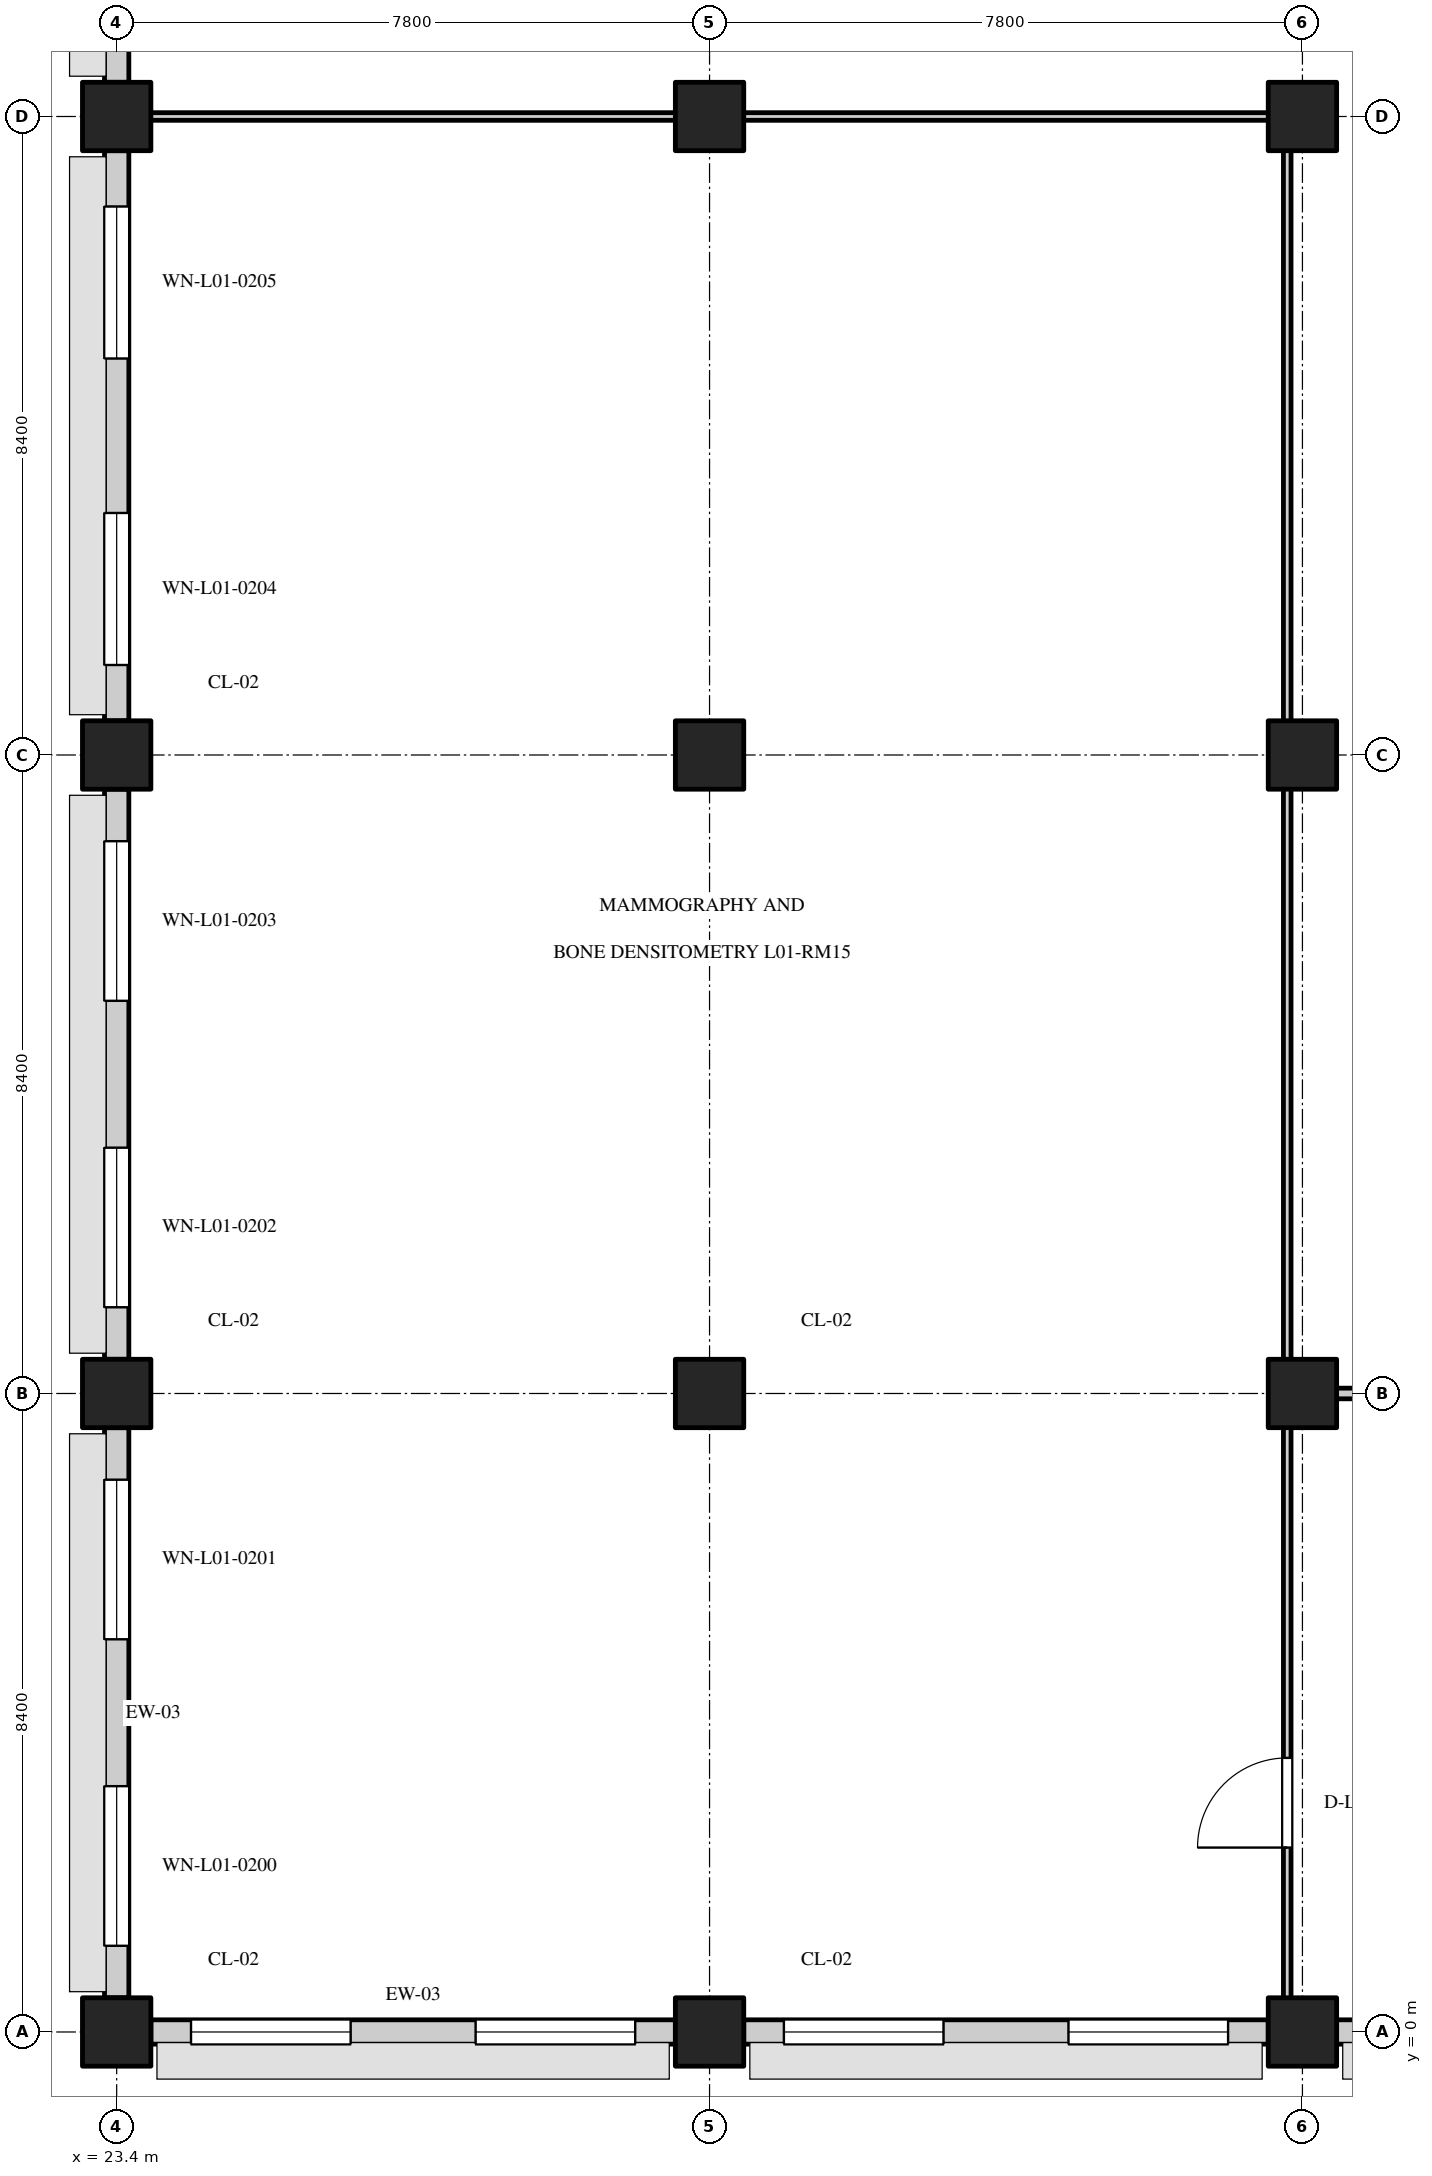
"""IFC4 building model, lengths in metres.
Left out: names, types, materials, properties, quantities, classifications, styles, units other than length and angle.
Written with IfcOpenShell. Run it as: python <this file> out.ifc"""

import sys

from ifc_helpers import new_model, si_unit, direction, frame, frame_2d, origin, origin_2d, place, context, subcontext, project, spatial, rectangle, extrude, element, fill, save


model = new_model("IFC4")
c1 = context("Model", 3, precision=1e-05, world=origin(), true_north=direction((0.0, 1.0)))
c2 = subcontext(c1, "Body", "Model", "MODEL_VIEW")
j1 = project(units=[si_unit("LENGTHUNIT", "METRE"), si_unit("PLANEANGLEUNIT", "RADIAN")], contexts=[c1])
p1 = place(None, origin())
s1 = spatial("IfcSite", under=j1, at=p1, CompositionType="ELEMENT")
p2 = place(p1, origin())
s2 = spatial("IfcBuilding", under=s1, at=p2, CompositionType="ELEMENT")
p3 = place(p2, frame((0.0, 0.0, 4.8)))
s3 = spatial("IfcBuildingStorey", under=s2, at=p3, CompositionType="ELEMENT", Elevation=4.8)
for number, where, z_axis, x_axis in (
    (1, (23.4, 0.0, 0.0), (0.0, 0.0, 1.0), (1.0, 0.0, 0.0)),
    (2, (23.4, 8.4, 0.0), (0.0, 0.0, 1.0), (1.0, 0.0, 0.0)),
    (3, (23.4, 16.8, 0.0), (0.0, 0.0, 1.0), (1.0, 0.0, 0.0)),
    (4, (23.4, 25.2, 0.0), (0.0, 0.0, 1.0), (1.0, 0.0, 0.0)),
    (5, (31.2, 0.0, 0.0), (0.0, 0.0, 1.0), (1.0, 0.0, 0.0)),
    (6, (31.2, 8.4, 0.0), (0.0, 0.0, 1.0), (1.0, 0.0, 0.0)),
    (7, (31.2, 16.8, 0.0), (0.0, 0.0, 1.0), (1.0, 0.0, 0.0)),
    (8, (31.2, 25.2, 0.0), (0.0, 0.0, 1.0), (1.0, 0.0, 0.0)),
    (9, (39.0, 0.0, 0.0), (0.0, 0.0, 1.0), (1.0, 0.0, 0.0)),
    (10, (39.0, 8.4, 0.0), (0.0, 0.0, 1.0), (1.0, 0.0, 0.0)),
    (11, (39.0, 16.8, 0.0), (0.0, 0.0, 1.0), (1.0, 0.0, 0.0)),
    (12, (39.0, 25.2, 0.0), (0.0, 0.0, 1.0), (1.0, 0.0, 0.0)),
):
    element("IfcColumn", number, at=place(p3, frame(where, z_axis=z_axis, x_axis=x_axis)), inside=s3, PredefinedType="COLUMN", context=c2, shape_type="SweptSolid", body=[
        extrude(rectangle(XDim=0.9, YDim=0.9, at=origin_2d()), origin(), (0.0, 0.0, 1.0), 4.8),
    ])
p4 = place(p3, frame((23.85, 0.0, 0.0), z_axis=(0.0, 0.0, 1.0), x_axis=(1.0, 0.0, 0.0)))
e13 = element("IfcWall", 13, at=p4, inside=s3, PredefinedType="STANDARD", context=c2, shape_type="SweptSolid", body=[
    extrude(rectangle(XDim=6.9, YDim=0.32, at=frame_2d((3.45, 0.0))), origin(), (0.0, 0.0, 1.0), 3.75),
])
p5 = place(p4, frame((0.528, 0.0, 0.75)))
e14 = element("IfcOpeningElement", 14, at=p5, cuts=e13, PredefinedType="OPENING", context=c2, shape_type="SweptSolid", body=[
    extrude(rectangle(XDim=2.1, YDim=1.55, at=frame_2d((1.05, 0.775))), frame((0.0, 0.172, 0.0), z_axis=(0.0, -1.0, 0.0), x_axis=(1.0, 0.0, 0.0)), (0.0, 0.0, 1.0), 0.344),
])
p6 = place(p4, frame((4.272, 0.0, 0.75)))
e15 = element("IfcOpeningElement", 15, at=p6, cuts=e13, PredefinedType="OPENING", context=c2, shape_type="SweptSolid", body=[
    extrude(rectangle(XDim=2.1, YDim=1.55, at=frame_2d((1.05, 0.775))), frame((0.0, 0.172, 0.0), z_axis=(0.0, -1.0, 0.0), x_axis=(1.0, 0.0, 0.0)), (0.0, 0.0, 1.0), 0.344),
])
p7 = place(p3, frame((31.65, 0.0, 0.0), z_axis=(0.0, 0.0, 1.0), x_axis=(1.0, 0.0, 0.0)))
e16 = element("IfcWall", 16, at=p7, inside=s3, PredefinedType="STANDARD", context=c2, shape_type="SweptSolid", body=[
    extrude(rectangle(XDim=6.9, YDim=0.32, at=frame_2d((3.45, 0.0))), origin(), (0.0, 0.0, 1.0), 3.75),
])
p8 = place(p7, frame((0.528, 0.0, 0.75)))
e17 = element("IfcOpeningElement", 17, at=p8, cuts=e16, PredefinedType="OPENING", context=c2, shape_type="SweptSolid", body=[
    extrude(rectangle(XDim=2.1, YDim=1.45, at=frame_2d((1.05, 0.725))), frame((0.0, 0.172, 0.0), z_axis=(0.0, -1.0, 0.0), x_axis=(1.0, 0.0, 0.0)), (0.0, 0.0, 1.0), 0.344),
])
p9 = place(p7, frame((4.272, 0.0, 0.75)))
e18 = element("IfcOpeningElement", 18, at=p9, cuts=e16, PredefinedType="OPENING", context=c2, shape_type="SweptSolid", body=[
    extrude(rectangle(XDim=2.1, YDim=1.45, at=frame_2d((1.05, 0.725))), frame((0.0, 0.172, 0.0), z_axis=(0.0, -1.0, 0.0), x_axis=(1.0, 0.0, 0.0)), (0.0, 0.0, 1.0), 0.344),
])
p10 = place(p3, frame((39.45, 0.0, 0.0), z_axis=(0.0, 0.0, 1.0), x_axis=(1.0, 0.0, 0.0)))
e19 = element("IfcWall", 19, at=p10, inside=s3, PredefinedType="STANDARD", context=c2, shape_type="SweptSolid", body=[
    extrude(rectangle(XDim=6.9, YDim=0.32, at=frame_2d((3.45, 0.0))), origin(), (0.0, 0.0, 1.0), 3.75),
])
p11 = place(p10, frame((0.578, 0.0, 0.75)))
e20 = element("IfcOpeningElement", 20, at=p11, cuts=e19, PredefinedType="OPENING", context=c2, shape_type="SweptSolid", body=[
    extrude(rectangle(XDim=2.0, YDim=1.75, at=frame_2d((1.0, 0.875))), frame((0.0, 0.172, 0.0), z_axis=(0.0, -1.0, 0.0), x_axis=(1.0, 0.0, 0.0)), (0.0, 0.0, 1.0), 0.344),
])
p12 = place(p10, frame((4.322, 0.0, 0.75)))
e21 = element("IfcOpeningElement", 21, at=p12, cuts=e19, PredefinedType="OPENING", context=c2, shape_type="SweptSolid", body=[
    extrude(rectangle(XDim=2.0, YDim=1.75, at=frame_2d((1.0, 0.875))), frame((0.0, 0.172, 0.0), z_axis=(0.0, -1.0, 0.0), x_axis=(1.0, 0.0, 0.0)), (0.0, 0.0, 1.0), 0.344),
])
p13 = place(p3, frame((23.4, 0.45, 0.0), z_axis=(0.0, 0.0, 1.0), x_axis=(0.0, 1.0, 0.0)))
e22 = element("IfcWall", 22, at=p13, inside=s3, PredefinedType="STANDARD", context=c2, shape_type="SweptSolid", body=[
    extrude(rectangle(XDim=7.5, YDim=0.32, at=frame_2d((3.75, 0.0))), origin(), (0.0, 0.0, 1.0), 3.75),
])
p14 = place(p13, frame((0.684, 0.0, 0.75)))
e23 = element("IfcOpeningElement", 23, at=p14, cuts=e22, PredefinedType="OPENING", context=c2, shape_type="SweptSolid", body=[
    extrude(rectangle(XDim=2.1, YDim=1.55, at=frame_2d((1.05, 0.775))), frame((0.0, 0.172, 0.0), z_axis=(0.0, -1.0, 0.0), x_axis=(1.0, 0.0, 0.0)), (0.0, 0.0, 1.0), 0.344),
])
p15 = place(p13, frame((4.716, 0.0, 0.75)))
e24 = element("IfcOpeningElement", 24, at=p15, cuts=e22, PredefinedType="OPENING", context=c2, shape_type="SweptSolid", body=[
    extrude(rectangle(XDim=2.1, YDim=1.55, at=frame_2d((1.05, 0.775))), frame((0.0, 0.172, 0.0), z_axis=(0.0, -1.0, 0.0), x_axis=(1.0, 0.0, 0.0)), (0.0, 0.0, 1.0), 0.344),
])
p16 = place(p3, frame((23.4, 8.85, 0.0), z_axis=(0.0, 0.0, 1.0), x_axis=(0.0, 1.0, 0.0)))
e25 = element("IfcWall", 25, at=p16, inside=s3, PredefinedType="STANDARD", context=c2, shape_type="SweptSolid", body=[
    extrude(rectangle(XDim=7.5, YDim=0.32, at=frame_2d((3.75, 0.0))), origin(), (0.0, 0.0, 1.0), 3.75),
])
p17 = place(p16, frame((0.684, 0.0, 0.75)))
e26 = element("IfcOpeningElement", 26, at=p17, cuts=e25, PredefinedType="OPENING", context=c2, shape_type="SweptSolid", body=[
    extrude(rectangle(XDim=2.1, YDim=1.45, at=frame_2d((1.05, 0.725))), frame((0.0, 0.172, 0.0), z_axis=(0.0, -1.0, 0.0), x_axis=(1.0, 0.0, 0.0)), (0.0, 0.0, 1.0), 0.344),
])
p18 = place(p16, frame((4.716, 0.0, 0.75)))
e27 = element("IfcOpeningElement", 27, at=p18, cuts=e25, PredefinedType="OPENING", context=c2, shape_type="SweptSolid", body=[
    extrude(rectangle(XDim=2.1, YDim=1.45, at=frame_2d((1.05, 0.725))), frame((0.0, 0.172, 0.0), z_axis=(0.0, -1.0, 0.0), x_axis=(1.0, 0.0, 0.0)), (0.0, 0.0, 1.0), 0.344),
])
p19 = place(p3, frame((23.4, 17.25, 0.0), z_axis=(0.0, 0.0, 1.0), x_axis=(0.0, 1.0, 0.0)))
e28 = element("IfcWall", 28, at=p19, inside=s3, PredefinedType="STANDARD", context=c2, shape_type="SweptSolid", body=[
    extrude(rectangle(XDim=7.5, YDim=0.32, at=frame_2d((3.75, 0.0))), origin(), (0.0, 0.0, 1.0), 3.75),
])
p20 = place(p19, frame((0.734, 0.0, 0.75)))
e29 = element("IfcOpeningElement", 29, at=p20, cuts=e28, PredefinedType="OPENING", context=c2, shape_type="SweptSolid", body=[
    extrude(rectangle(XDim=2.0, YDim=1.75, at=frame_2d((1.0, 0.875))), frame((0.0, 0.172, 0.0), z_axis=(0.0, -1.0, 0.0), x_axis=(1.0, 0.0, 0.0)), (0.0, 0.0, 1.0), 0.344),
])
p21 = place(p19, frame((4.766, 0.0, 0.75)))
e30 = element("IfcOpeningElement", 30, at=p21, cuts=e28, PredefinedType="OPENING", context=c2, shape_type="SweptSolid", body=[
    extrude(rectangle(XDim=2.0, YDim=1.75, at=frame_2d((1.0, 0.875))), frame((0.0, 0.172, 0.0), z_axis=(0.0, -1.0, 0.0), x_axis=(1.0, 0.0, 0.0)), (0.0, 0.0, 1.0), 0.344),
])
p22 = place(p3, frame((23.4, 25.65, 0.0), z_axis=(0.0, 0.0, 1.0), x_axis=(0.0, 1.0, 0.0)))
e31 = element("IfcWall", 31, at=p22, inside=s3, PredefinedType="STANDARD", context=c2, shape_type="SweptSolid", body=[
    extrude(rectangle(XDim=7.5, YDim=0.32, at=frame_2d((3.75, 0.0))), origin(), (0.0, 0.0, 1.0), 3.75),
])
p23 = place(p22, frame((0.734, 0.0, 0.75)))
e32 = element("IfcOpeningElement", 32, at=p23, cuts=e31, PredefinedType="OPENING", context=c2, shape_type="SweptSolid", body=[
    extrude(rectangle(XDim=2.0, YDim=1.65, at=frame_2d((1.0, 0.825))), frame((0.0, 0.172, 0.0), z_axis=(0.0, -1.0, 0.0), x_axis=(1.0, 0.0, 0.0)), (0.0, 0.0, 1.0), 0.344),
])
p24 = place(p22, frame((4.766, 0.0, 0.75)))
e33 = element("IfcOpeningElement", 33, at=p24, cuts=e31, PredefinedType="OPENING", context=c2, shape_type="SweptSolid", body=[
    extrude(rectangle(XDim=2.0, YDim=1.65, at=frame_2d((1.0, 0.825))), frame((0.0, 0.172, 0.0), z_axis=(0.0, -1.0, 0.0), x_axis=(1.0, 0.0, 0.0)), (0.0, 0.0, 1.0), 0.344),
])
p25 = place(p3, frame((38.8, 0.085, 0.0), z_axis=(0.0, 0.0, 1.0), x_axis=(0.0, 1.0, 0.0)))
e34 = element("IfcWall", 34, at=p25, inside=s3, PredefinedType="PARTITIONING", context=c2, shape_type="SweptSolid", body=[
    extrude(rectangle(XDim=25.03, YDim=0.1, at=frame_2d((12.515, 0.0))), origin(), (0.0, 0.0, 1.0), 3.7),
])
p26 = place(p25, frame((2.341, 0.0, 0.0)))
e35 = element("IfcOpeningElement", 35, at=p26, cuts=e34, PredefinedType="OPENING", context=c2, shape_type="SweptSolid", body=[
    extrude(rectangle(XDim=1.18, YDim=2.2, at=frame_2d((0.59, 1.1))), frame((0.0, 0.062, 0.0), z_axis=(0.0, -1.0, 0.0), x_axis=(1.0, 0.0, 0.0)), (0.0, 0.0, 1.0), 0.124),
])
p27 = place(p3, frame((30.79, 0.0, 0.0), z_axis=(0.0, 0.0, 1.0), x_axis=(1.0, 0.0, 0.0)))
e36 = element("IfcWall", 36, at=p27, inside=s3, PredefinedType="PARTITIONING", context=c2, shape_type="SweptSolid", body=[
    extrude(rectangle(XDim=0.82, YDim=0.1, at=frame_2d((0.41, 0.0))), origin(), (0.0, 0.0, 1.0), 3.7),
])
p28 = place(p3, frame((23.485, 25.2, 0.0), z_axis=(0.0, 0.0, 1.0), x_axis=(1.0, 0.0, 0.0)))
e37 = element("IfcWall", 37, at=p28, inside=s3, PredefinedType="PARTITIONING", context=c2, shape_type="SweptSolid", body=[
    extrude(rectangle(XDim=15.23, YDim=0.1, at=frame_2d((7.615, 0.0))), origin(), (0.0, 0.0, 1.0), 3.7),
])
for number, where, z_axis, x_axis in (
    (38, (23.4, 7.99, 0.0), (0.0, 0.0, 1.0), (0.0, 1.0, 0.0)),
    (39, (23.4, 16.39, 0.0), (0.0, 0.0, 1.0), (0.0, 1.0, 0.0)),
):
    element("IfcWall", number, at=place(p3, frame(where, z_axis=z_axis, x_axis=x_axis)), inside=s3, PredefinedType="PARTITIONING", context=c2, shape_type="SweptSolid", body=[
        extrude(rectangle(XDim=0.82, YDim=0.1, at=frame_2d((0.41, 0.0))), origin(), (0.0, 0.0, 1.0), 3.7),
    ])
p29 = place(p3, frame((39.085, 8.4, 0.0), z_axis=(0.0, 0.0, 1.0), x_axis=(1.0, 0.0, 0.0)))
e40 = element("IfcWall", 40, at=p29, inside=s3, PredefinedType="PARTITIONING", context=c2, shape_type="SweptSolid", body=[
    extrude(rectangle(XDim=15.23, YDim=0.14, at=frame_2d((7.615, 0.0))), origin(), (0.0, 0.0, 1.0), 4.43),
])
p30 = place(p29, frame((2.644, 0.0, 0.0)))
e41 = element("IfcOpeningElement", 41, at=p30, cuts=e40, PredefinedType="OPENING", context=c2, shape_type="SweptSolid", body=[
    extrude(rectangle(XDim=1.05, YDim=2.1, at=frame_2d((0.525, 1.05))), frame((0.0, 0.082, 0.0), z_axis=(0.0, -1.0, 0.0), x_axis=(1.0, 0.0, 0.0)), (0.0, 0.0, 1.0), 0.164),
])
p31 = place(p5, origin())
e42 = element("IfcWindow", 42, at=p31, inside=s3, PartitioningType="DOUBLE_PANEL_VERTICAL", PredefinedType="WINDOW", context=c2, shape_type="SweptSolid", body=[
    extrude(rectangle(XDim=2.1, YDim=1.55, at=frame_2d((1.05, 0.775))), frame((0.0, 0.03, 0.0), z_axis=(0.0, -1.0, 0.0), x_axis=(1.0, 0.0, 0.0)), (0.0, 0.0, 1.0), 0.06),
])
fill(e14, e42)
p32 = place(p6, origin())
e43 = element("IfcWindow", 43, at=p32, inside=s3, PartitioningType="DOUBLE_PANEL_VERTICAL", PredefinedType="WINDOW", context=c2, shape_type="SweptSolid", body=[
    extrude(rectangle(XDim=2.1, YDim=1.55, at=frame_2d((1.05, 0.775))), frame((0.0, 0.03, 0.0), z_axis=(0.0, -1.0, 0.0), x_axis=(1.0, 0.0, 0.0)), (0.0, 0.0, 1.0), 0.06),
])
fill(e15, e43)
p33 = place(p8, origin())
e44 = element("IfcWindow", 44, at=p33, inside=s3, PartitioningType="DOUBLE_PANEL_VERTICAL", PredefinedType="WINDOW", context=c2, shape_type="SweptSolid", body=[
    extrude(rectangle(XDim=2.1, YDim=1.45, at=frame_2d((1.05, 0.725))), frame((0.0, 0.03, 0.0), z_axis=(0.0, -1.0, 0.0), x_axis=(1.0, 0.0, 0.0)), (0.0, 0.0, 1.0), 0.06),
])
fill(e17, e44)
p34 = place(p9, origin())
e45 = element("IfcWindow", 45, at=p34, inside=s3, PartitioningType="DOUBLE_PANEL_VERTICAL", PredefinedType="WINDOW", context=c2, shape_type="SweptSolid", body=[
    extrude(rectangle(XDim=2.1, YDim=1.45, at=frame_2d((1.05, 0.725))), frame((0.0, 0.03, 0.0), z_axis=(0.0, -1.0, 0.0), x_axis=(1.0, 0.0, 0.0)), (0.0, 0.0, 1.0), 0.06),
])
fill(e18, e45)
p35 = place(p14, origin())
e46 = element("IfcWindow", 46, at=p35, inside=s3, PartitioningType="DOUBLE_PANEL_VERTICAL", PredefinedType="WINDOW", context=c2, shape_type="SweptSolid", body=[
    extrude(rectangle(XDim=2.1, YDim=1.55, at=frame_2d((1.05, 0.775))), frame((0.0, 0.03, 0.0), z_axis=(0.0, -1.0, 0.0), x_axis=(1.0, 0.0, 0.0)), (0.0, 0.0, 1.0), 0.06),
])
fill(e23, e46)
p36 = place(p15, origin())
e47 = element("IfcWindow", 47, at=p36, inside=s3, PartitioningType="DOUBLE_PANEL_VERTICAL", PredefinedType="WINDOW", context=c2, shape_type="SweptSolid", body=[
    extrude(rectangle(XDim=2.1, YDim=1.55, at=frame_2d((1.05, 0.775))), frame((0.0, 0.03, 0.0), z_axis=(0.0, -1.0, 0.0), x_axis=(1.0, 0.0, 0.0)), (0.0, 0.0, 1.0), 0.06),
])
fill(e24, e47)
p37 = place(p17, origin())
e48 = element("IfcWindow", 48, at=p37, inside=s3, PartitioningType="DOUBLE_PANEL_VERTICAL", PredefinedType="WINDOW", context=c2, shape_type="SweptSolid", body=[
    extrude(rectangle(XDim=2.1, YDim=1.45, at=frame_2d((1.05, 0.725))), frame((0.0, 0.03, 0.0), z_axis=(0.0, -1.0, 0.0), x_axis=(1.0, 0.0, 0.0)), (0.0, 0.0, 1.0), 0.06),
])
fill(e26, e48)
p38 = place(p18, origin())
e49 = element("IfcWindow", 49, at=p38, inside=s3, PartitioningType="DOUBLE_PANEL_VERTICAL", PredefinedType="WINDOW", context=c2, shape_type="SweptSolid", body=[
    extrude(rectangle(XDim=2.1, YDim=1.45, at=frame_2d((1.05, 0.725))), frame((0.0, 0.03, 0.0), z_axis=(0.0, -1.0, 0.0), x_axis=(1.0, 0.0, 0.0)), (0.0, 0.0, 1.0), 0.06),
])
fill(e27, e49)
p39 = place(p20, origin())
e50 = element("IfcWindow", 50, at=p39, inside=s3, PartitioningType="DOUBLE_PANEL_VERTICAL", PredefinedType="WINDOW", context=c2, shape_type="SweptSolid", body=[
    extrude(rectangle(XDim=2.0, YDim=1.75, at=frame_2d((1.0, 0.875))), frame((0.0, 0.03, 0.0), z_axis=(0.0, -1.0, 0.0), x_axis=(1.0, 0.0, 0.0)), (0.0, 0.0, 1.0), 0.06),
])
fill(e29, e50)
p40 = place(p21, origin())
e51 = element("IfcWindow", 51, at=p40, inside=s3, PartitioningType="DOUBLE_PANEL_VERTICAL", PredefinedType="WINDOW", context=c2, shape_type="SweptSolid", body=[
    extrude(rectangle(XDim=2.0, YDim=1.75, at=frame_2d((1.0, 0.875))), frame((0.0, 0.03, 0.0), z_axis=(0.0, -1.0, 0.0), x_axis=(1.0, 0.0, 0.0)), (0.0, 0.0, 1.0), 0.06),
])
fill(e30, e51)
p41 = place(p26, origin())
e52 = element("IfcDoor", 52, at=p41, inside=s3, OperationType="SINGLE_SWING_LEFT", PredefinedType="DOOR", context=c2, shape_type="SweptSolid", body=[
    extrude(rectangle(XDim=1.18, YDim=2.2, at=frame_2d((0.59, 1.1))), frame((0.0, 0.025, 0.0), z_axis=(0.0, -1.0, 0.0), x_axis=(1.0, 0.0, 0.0)), (0.0, 0.0, 1.0), 0.05),
])
fill(e35, e52)
save(model, sys.argv[1])
